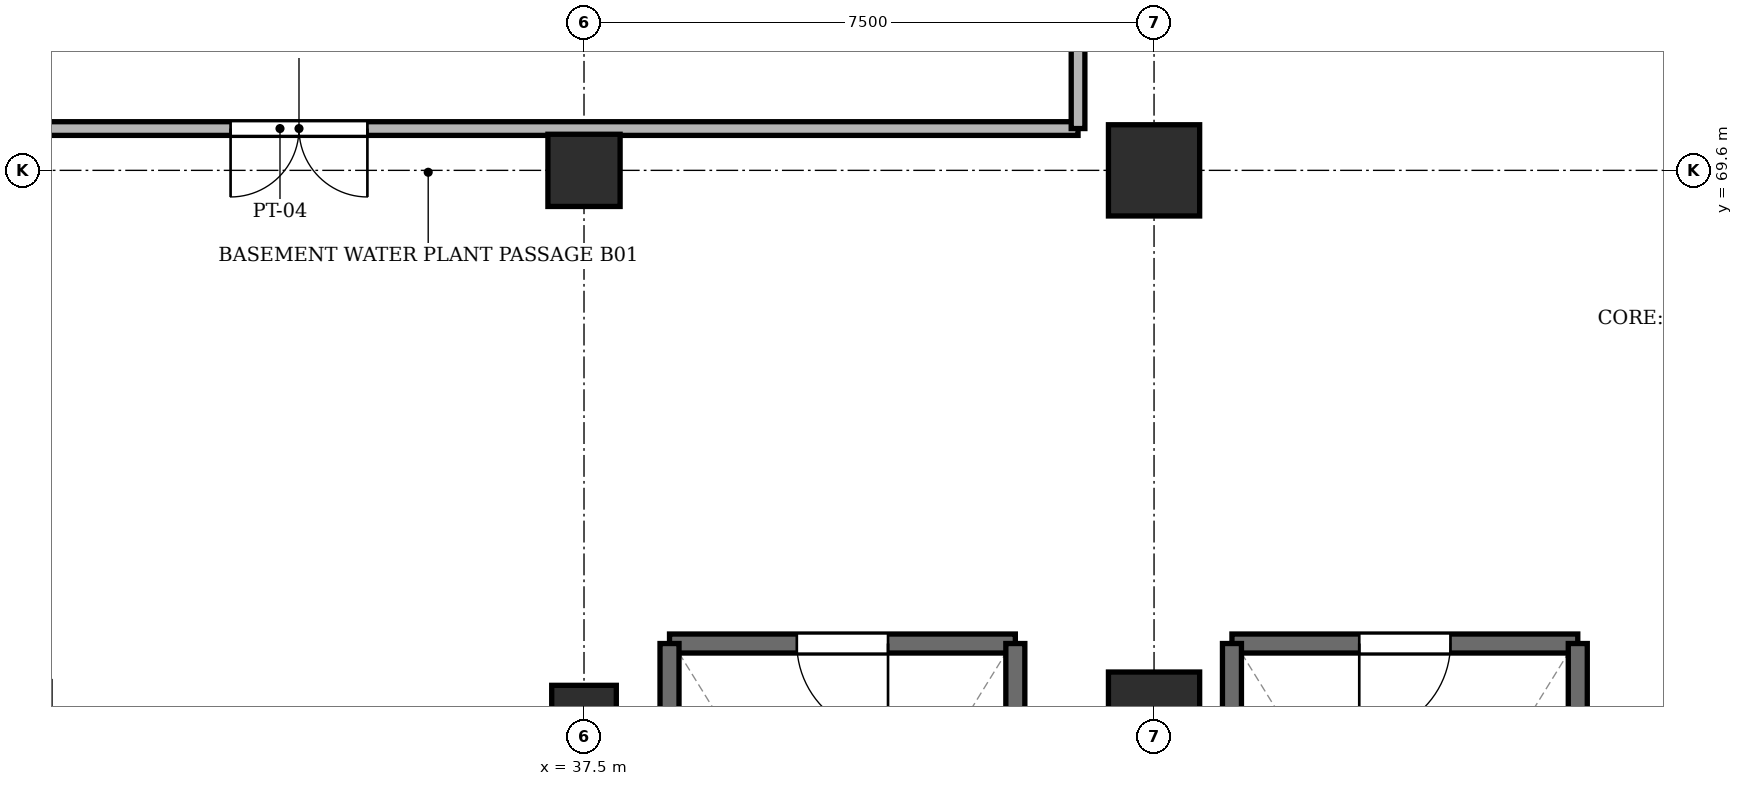
"""IFC4 building model, lengths in metres.
Left out: names, types, materials, properties, quantities, classifications, styles, units other than length and angle.
Written with IfcOpenShell. Run it as: python <this file> out.ifc"""

import sys

from ifc_helpers import new_model, si_unit, direction, frame, frame_2d, origin, origin_2d, place, context, subcontext, project, spatial, rectangle, extrude, element, fill, save


model = new_model("IFC4")
c1 = context("Model", 3, precision=1e-05, world=origin(), true_north=direction((0.0, 1.0)))
c2 = subcontext(c1, "Body", "Model", "MODEL_VIEW")
j1 = project(units=[si_unit("LENGTHUNIT", "METRE"), si_unit("PLANEANGLEUNIT", "RADIAN")], contexts=[c1])
p1 = place(None, origin())
s1 = spatial("IfcSite", under=j1, at=p1, CompositionType="ELEMENT")
p2 = place(p1, origin())
s2 = spatial("IfcBuilding", under=s1, at=p2, CompositionType="ELEMENT")
p3 = place(p2, frame((0.0, 0.0, -4.5)))
s3 = spatial("IfcBuildingStorey", under=s2, at=p3, CompositionType="ELEMENT", Elevation=-4.5)
p4 = place(p3, frame((37.5, 62.4, -0.32), z_axis=(0.0, 0.0, 1.0), x_axis=(1.0, 0.0, 0.0)))
e1 = element("IfcColumn", 1, at=p4, inside=s3, PredefinedType="COLUMN", context=c2, shape_type="SweptSolid", body=[
    extrude(rectangle(XDim=0.85, YDim=0.85, at=origin_2d()), origin(), (0.0, 0.0, 1.0), 4.47),
])
p5 = place(p3, frame((37.5, 69.6, -0.32), z_axis=(0.0, 0.0, 1.0), x_axis=(1.0, 0.0, 0.0)))
e2 = element("IfcColumn", 2, at=p5, inside=s3, PredefinedType="COLUMN", context=c2, shape_type="SweptSolid", body=[
    extrude(rectangle(XDim=0.95, YDim=0.95, at=origin_2d()), origin(), (0.0, 0.0, 1.0), 4.47),
])
for number, where, z_axis, x_axis in (
    (3, (45.0, 62.4, -0.32), (0.0, 0.0, 1.0), (1.0, 0.0, 0.0)),
    (4, (45.0, 69.6, -0.32), (0.0, 0.0, 1.0), (1.0, 0.0, 0.0)),
):
    element("IfcColumn", number, at=place(p3, frame(where, z_axis=z_axis, x_axis=x_axis)), inside=s3, PredefinedType="COLUMN", context=c2, shape_type="SweptSolid", body=[
        extrude(rectangle(XDim=1.2, YDim=1.2, at=origin_2d()), origin(), (0.0, 0.0, 1.0), 4.47),
    ])
p6 = place(p3, frame((50.575, 63.375, 0.0), z_axis=(0.0, 0.0, 1.0), x_axis=(-1.0, 0.0, 0.0)))
e5 = element("IfcWall", 5, at=p6, inside=s3, PredefinedType="SHEAR", context=c2, shape_type="SweptSolid", body=[
    extrude(rectangle(XDim=4.55, YDim=0.25, at=frame_2d((2.275, 0.0))), origin(), (0.0, 0.0, 1.0), 4.15),
])
p7 = place(p6, frame((1.675, 0.0, 0.0)))
e6 = element("IfcOpeningElement", 6, at=p7, cuts=e5, PredefinedType="OPENING", context=c2, shape_type="SweptSolid", body=[
    extrude(rectangle(XDim=1.2, YDim=2.2, at=frame_2d((0.6, 1.1))), frame((0.0, 0.137, 0.0), z_axis=(0.0, -1.0, 0.0), x_axis=(1.0, 0.0, 0.0)), (0.0, 0.0, 1.0), 0.274),
])
for number, where, z_axis, x_axis in (
    (7, (46.025, 63.375, 0.0), (0.0, 0.0, 1.0), (0.0, -1.0, 0.0)),
    (8, (50.575, 56.175, 0.0), (0.0, 0.0, 1.0), (0.0, 1.0, 0.0)),
):
    element("IfcWall", number, at=place(p3, frame(where, z_axis=z_axis, x_axis=x_axis)), inside=s3, PredefinedType="SHEAR", context=c2, shape_type="SweptSolid", body=[
        extrude(rectangle(XDim=7.2, YDim=0.25, at=frame_2d((3.6, 0.0))), origin(), (0.0, 0.0, 1.0), 4.15),
    ])
p8 = place(p3, frame((43.175, 63.375, 0.0), z_axis=(0.0, 0.0, 1.0), x_axis=(-1.0, 0.0, 0.0)))
e9 = element("IfcWall", 9, at=p8, inside=s3, PredefinedType="SHEAR", context=c2, shape_type="SweptSolid", body=[
    extrude(rectangle(XDim=4.55, YDim=0.25, at=frame_2d((2.275, 0.0))), origin(), (0.0, 0.0, 1.0), 4.15),
])
p9 = place(p8, frame((1.675, 0.0, 0.0)))
e10 = element("IfcOpeningElement", 10, at=p9, cuts=e9, PredefinedType="OPENING", context=c2, shape_type="SweptSolid", body=[
    extrude(rectangle(XDim=1.2, YDim=2.2, at=frame_2d((0.6, 1.1))), frame((0.0, 0.137, 0.0), z_axis=(0.0, -1.0, 0.0), x_axis=(1.0, 0.0, 0.0)), (0.0, 0.0, 1.0), 0.274),
])
for number, where, z_axis, x_axis in (
    (11, (38.625, 63.375, 0.0), (0.0, 0.0, 1.0), (0.0, -1.0, 0.0)),
    (12, (43.175, 56.175, 0.0), (0.0, 0.0, 1.0), (0.0, 1.0, 0.0)),
):
    element("IfcWall", number, at=place(p3, frame(where, z_axis=z_axis, x_axis=x_axis)), inside=s3, PredefinedType="SHEAR", context=c2, shape_type="SweptSolid", body=[
        extrude(rectangle(XDim=7.2, YDim=0.25, at=frame_2d((3.6, 0.0))), origin(), (0.0, 0.0, 1.0), 4.15),
    ])
p10 = place(p3, frame((23.0, 70.15, 0.0), z_axis=(0.0, 0.0, 1.0), x_axis=(1.0, 0.0, 0.0)))
e13 = element("IfcWall", 13, at=p10, inside=s3, PredefinedType="PARTITIONING", context=c2, shape_type="SweptSolid", body=[
    extrude(rectangle(XDim=21.0, YDim=0.18, at=frame_2d((10.5, 0.0))), origin(), (0.0, 0.0, 1.0), 3.78),
])
p11 = place(p10, frame((9.85, 0.0, 0.0)))
e14 = element("IfcOpeningElement", 14, at=p11, cuts=e13, PredefinedType="OPENING", context=c2, shape_type="SweptSolid", body=[
    extrude(rectangle(XDim=1.8, YDim=2.25, at=frame_2d((0.9, 1.125))), frame((0.0, 0.102, 0.0), z_axis=(0.0, -1.0, 0.0), x_axis=(1.0, 0.0, 0.0)), (0.0, 0.0, 1.0), 0.204),
])
p12 = place(p3, frame((44.0, 70.15, 0.0), z_axis=(0.0, 0.0, 1.0), x_axis=(0.0, 1.0, 0.0)))
e15 = element("IfcWall", 15, at=p12, inside=s3, PredefinedType="PARTITIONING", context=c2, shape_type="SweptSolid", body=[
    extrude(rectangle(XDim=6.75, YDim=0.18, at=frame_2d((3.375, 0.0))), origin(), (0.0, 0.0, 1.0), 3.78),
])
p13 = place(p7, origin())
e16 = element("IfcDoor", 16, at=p13, inside=s3, OperationType="SINGLE_SWING_RIGHT", PredefinedType="DOOR", context=c2, shape_type="SweptSolid", body=[
    extrude(rectangle(XDim=1.2, YDim=2.2, at=frame_2d((0.6, 1.1))), frame((0.0, 0.025, 0.0), z_axis=(0.0, -1.0, 0.0), x_axis=(1.0, 0.0, 0.0)), (0.0, 0.0, 1.0), 0.05),
])
fill(e6, e16)
p14 = place(p9, origin())
e17 = element("IfcDoor", 17, at=p14, inside=s3, OperationType="SINGLE_SWING_LEFT", PredefinedType="DOOR", context=c2, shape_type="SweptSolid", body=[
    extrude(rectangle(XDim=1.2, YDim=2.2, at=frame_2d((0.6, 1.1))), frame((0.0, 0.025, 0.0), z_axis=(0.0, -1.0, 0.0), x_axis=(1.0, 0.0, 0.0)), (0.0, 0.0, 1.0), 0.05),
])
fill(e10, e17)
p15 = place(p11, frame((1.8, 0.0, 0.0), z_axis=(0.0, 0.0, 1.0), x_axis=(-1.0, 0.0, 0.0)))
e18 = element("IfcDoor", 18, at=p15, inside=s3, OperationType="DOUBLE_DOOR_SINGLE_SWING", PredefinedType="DOOR", context=c2, shape_type="SweptSolid", body=[
    extrude(rectangle(XDim=1.8, YDim=2.25, at=frame_2d((0.9, 1.125))), frame((0.0, 0.025, 0.0), z_axis=(0.0, -1.0, 0.0), x_axis=(1.0, 0.0, 0.0)), (0.0, 0.0, 1.0), 0.05),
])
fill(e14, e18)
save(model, sys.argv[1])
